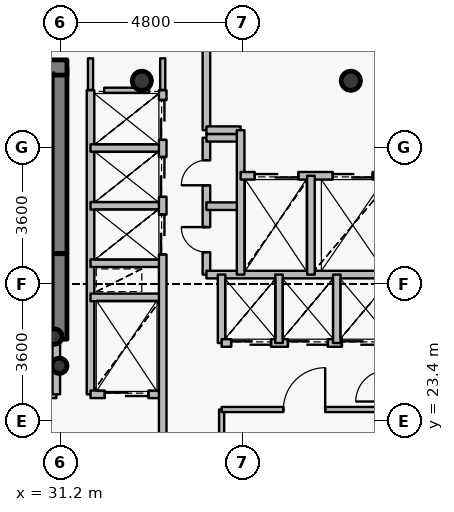
"""IFC4 building model, lengths in metres.
Left out: names, types, materials, properties, quantities, classifications, styles, units other than length and angle.
Written with IfcOpenShell. Run it as: python <this file> out.ifc"""

import sys

from ifc_helpers import new_model, si_unit, direction, frame, frame_2d, origin, origin_2d, place, context, subcontext, project, spatial, rectangle, hollow_circle, extrude, source, transform, mapped, element, fill, save


model = new_model("IFC4")
c1 = context("Model", 3, precision=1e-05, world=origin(), true_north=direction((0.0, 1.0)))
c2 = subcontext(c1, "Body", "Model", "MODEL_VIEW")
j1 = project(units=[si_unit("LENGTHUNIT", "METRE"), si_unit("PLANEANGLEUNIT", "RADIAN")], contexts=[c1])
p1 = place(None, origin())
s1 = spatial("IfcSite", under=j1, at=p1, CompositionType="ELEMENT")
p2 = place(p1, origin())
s2 = spatial("IfcBuilding", under=s1, at=p2, CompositionType="ELEMENT")
p3 = place(p2, frame((0.0, 0.0, 151.35)))
s3 = spatial("IfcBuildingStorey", under=s2, at=p3, CompositionType="ELEMENT", Elevation=151.35)
for number, where, z_axis, x_axis in (
    (1, (38.85, 32.35, 0.0), (0.0, 0.0, 1.0), (1.0, 0.0, 0.0)),
    (2, (33.35, 32.35, 0.0), (0.0, 0.0, 1.0), (1.0, 0.0, 0.0)),
):
    element("IfcColumn", number, at=place(p3, frame(where, z_axis=z_axis, x_axis=x_axis)), inside=s3, PredefinedType="COLUMN", context=c2, shape_type="SweptSolid", body=[
        extrude(hollow_circle(Radius=0.254, WallThickness=0.02, at=origin_2d()), origin(), (0.0, 0.0, 1.0), 4.8),
    ])
p4 = place(p3, frame((31.18, 27.8, 0.0), z_axis=(0.0, 0.0, 1.0), x_axis=(0.0, 1.0, 0.0)))
e3 = element("IfcWall", 3, at=p4, inside=s3, PredefinedType="SHEAR", context=c2, shape_type="SweptSolid", body=[
    extrude(rectangle(XDim=4.9, YDim=0.4, at=frame_2d((2.45, 0.0))), origin(), (0.0, 0.0, 1.0), 4.8),
])
p5 = place(p3, frame((27.28, 32.7, 0.0), z_axis=(0.0, 0.0, 1.0), x_axis=(1.0, 0.0, 0.0)))
e4 = element("IfcWall", 4, at=p5, inside=s3, PredefinedType="SHEAR", context=c2, shape_type="SweptSolid", body=[
    extrude(rectangle(XDim=4.1, YDim=0.4, at=frame_2d((2.05, 0.0))), origin(), (0.0, 0.0, 1.0), 4.8),
])
for number, where, z_axis, x_axis in (
    (5, (31.05, 25.62, 0.0), (0.0, 0.0, 1.0), (1.0, 0.0, 0.0)),
    (6, (31.18, 24.85, 0.0), (0.0, 0.0, 1.0), (1.0, 0.0, 0.0)),
):
    element("IfcColumn", number, at=place(p3, frame(where, z_axis=z_axis, x_axis=x_axis)), inside=s3, PredefinedType="COLUMN", context=c2, shape_type="SweptSolid", body=[
        extrude(hollow_circle(Radius=0.203, WallThickness=0.016, at=origin_2d()), origin(), (0.0, 0.0, 1.0), 4.8),
    ])
p6 = place(p3, frame((31.18, 25.55, 0.0), z_axis=(0.0, 0.0, 1.0), x_axis=(0.0, 1.0, 0.0)))
e7 = element("IfcWall", 7, at=p6, inside=s3, PredefinedType="SHEAR", context=c2, shape_type="SweptSolid", body=[
    extrude(rectangle(XDim=2.25, YDim=0.4, at=frame_2d((1.125, 0.0))), origin(), (0.0, 0.0, 1.0), 4.15),
])
p7 = place(p3, frame((27.56, 24.1, 0.0), z_axis=(0.0, 0.0, 1.0), x_axis=(1.0, 0.0, 0.0)))
e8 = element("IfcWall", 8, at=p7, inside=s3, PredefinedType="PARTITIONING", context=c2, shape_type="SweptSolid", body=[
    extrude(rectangle(XDim=3.54, YDim=0.2, at=frame_2d((1.77, 0.0))), origin(), (0.0, 0.0, 1.0), 4.55),
])
p8 = place(p7, frame((1.17, 0.0, 0.0)))
e9 = element("IfcOpeningElement", 9, at=p8, cuts=e8, PredefinedType="OPENING", context=c2, shape_type="SweptSolid", body=[
    extrude(rectangle(XDim=1.2, YDim=2.15, at=origin_2d()), frame((0.6, 0.11, 1.075), z_axis=(0.0, -1.0, 0.0), x_axis=(1.0, 0.0, 0.0)), (0.0, 0.0, 1.0), 0.22),
])
p9 = place(p3, frame((31.1, 24.1, 0.0), z_axis=(0.0, 0.0, 1.0), x_axis=(0.0, 1.0, 0.0)))
e10 = element("IfcWall", 10, at=p9, inside=s3, PredefinedType="PARTITIONING", context=c2, shape_type="SweptSolid", body=[
    extrude(rectangle(XDim=1.44, YDim=0.2, at=frame_2d((0.72, 0.0))), origin(), (0.0, 0.0, 1.0), 4.55),
])
p10 = place(p3, frame((32.0, 24.1, 0.0), z_axis=(0.0, 0.0, 1.0), x_axis=(0.0, 1.0, 0.0)))
e11 = element("IfcWall", 11, at=p10, inside=s3, PredefinedType="PARTITIONING", context=c2, shape_type="SweptSolid", body=[
    extrude(rectangle(XDim=8.0, YDim=0.2, at=frame_2d((4.0, 0.0))), origin(), (0.0, 0.0, 1.0), 4.55),
])
p11 = place(p3, frame((32.0, 24.1, 0.0), z_axis=(0.0, 0.0, 1.0), x_axis=(1.0, 0.0, 0.0)))
e12 = element("IfcWall", 12, at=p11, inside=s3, PredefinedType="PARTITIONING", context=c2, shape_type="SweptSolid", body=[
    extrude(rectangle(XDim=1.9, YDim=0.2, at=frame_2d((0.95, 0.0))), origin(), (0.0, 0.0, 1.0), 4.135),
])
p12 = place(p11, frame((0.375, 0.0, 0.0)))
e13 = element("IfcOpeningElement", 13, at=p12, cuts=e12, PredefinedType="OPENING", context=c2, shape_type="SweptSolid", body=[
    extrude(rectangle(XDim=1.15, YDim=2.15, at=origin_2d()), frame((0.575, 0.11, 1.075), z_axis=(0.0, -1.0, 0.0), x_axis=(1.0, 0.0, 0.0)), (0.0, 0.0, 1.0), 0.22),
])
for number, where, z_axis, x_axis in (
    (14, (32.0, 26.65, 0.0), (0.0, 0.0, 1.0), (1.0, 0.0, 0.0)),
    (15, (32.0, 27.55, 0.0), (0.0, 0.0, 1.0), (1.0, 0.0, 0.0)),
    (16, (32.0, 29.06, 0.0), (0.0, 0.0, 1.0), (1.0, 0.0, 0.0)),
    (17, (32.0, 30.58, 0.0), (0.0, 0.0, 1.0), (1.0, 0.0, 0.0)),
):
    element("IfcWall", number, at=place(p3, frame(where, z_axis=z_axis, x_axis=x_axis)), inside=s3, PredefinedType="PARTITIONING", context=c2, shape_type="SweptSolid", body=[
        extrude(rectangle(XDim=1.9, YDim=0.2, at=frame_2d((0.95, 0.0))), origin(), (0.0, 0.0, 1.0), 4.135),
    ])
p13 = place(p3, frame((33.9, 20.8, 0.0), z_axis=(0.0, 0.0, 1.0), x_axis=(0.0, 1.0, 0.0)))
e18 = element("IfcWall", 18, at=p13, inside=s3, PredefinedType="PARTITIONING", context=c2, shape_type="SweptSolid", body=[
    extrude(rectangle(XDim=11.3, YDim=0.2, at=frame_2d((5.65, 0.0))), origin(), (0.0, 0.0, 1.0), 4.135),
])
p14 = place(p13, frame((6.98, 0.0, 0.0)))
e19 = element("IfcOpeningElement", 19, at=p14, cuts=e18, PredefinedType="OPENING", context=c2, shape_type="SweptSolid", body=[
    extrude(rectangle(XDim=1.05, YDim=2.15, at=origin_2d()), frame((0.525, 0.11, 1.075), z_axis=(0.0, -1.0, 0.0), x_axis=(1.0, 0.0, 0.0)), (0.0, 0.0, 1.0), 0.22),
])
p15 = place(p13, frame((8.495, 0.0, 0.0)))
e20 = element("IfcOpeningElement", 20, at=p15, cuts=e18, PredefinedType="OPENING", context=c2, shape_type="SweptSolid", body=[
    extrude(rectangle(XDim=1.05, YDim=2.15, at=origin_2d()), frame((0.525, 0.11, 1.075), z_axis=(0.0, -1.0, 0.0), x_axis=(1.0, 0.0, 0.0)), (0.0, 0.0, 1.0), 0.22),
])
p16 = place(p13, frame((9.995, 0.0, 0.0)))
e21 = element("IfcOpeningElement", 21, at=p16, cuts=e18, PredefinedType="OPENING", context=c2, shape_type="SweptSolid", body=[
    extrude(rectangle(XDim=1.05, YDim=2.15, at=origin_2d()), frame((0.525, 0.11, 1.075), z_axis=(0.0, -1.0, 0.0), x_axis=(1.0, 0.0, 0.0)), (0.0, 0.0, 1.0), 0.22),
])
p17 = place(p3, frame((35.05, 27.25, 0.0), z_axis=(0.0, 0.0, 1.0), x_axis=(0.0, 1.0, 0.0)))
e22 = element("IfcWall", 22, at=p17, inside=s3, PredefinedType="PARTITIONING", context=c2, shape_type="SweptSolid", body=[
    extrude(rectangle(XDim=3.6, YDim=0.2, at=frame_2d((1.8, 0.0))), origin(), (0.0, 0.0, 1.0), 4.55),
])
p18 = place(p17, frame((0.59, 0.0, 0.0)))
e23 = element("IfcOpeningElement", 23, at=p18, cuts=e22, PredefinedType="OPENING", context=c2, shape_type="SweptSolid", body=[
    extrude(rectangle(XDim=0.66, YDim=2.05, at=origin_2d()), frame((0.33, 0.11, 1.025), z_axis=(0.0, -1.0, 0.0), x_axis=(1.0, 0.0, 0.0)), (0.0, 0.0, 1.0), 0.22),
])
p19 = place(p17, frame((2.35, 0.0, 0.0)))
e24 = element("IfcOpeningElement", 24, at=p19, cuts=e22, PredefinedType="OPENING", context=c2, shape_type="SweptSolid", body=[
    extrude(rectangle(XDim=0.66, YDim=2.05, at=origin_2d()), frame((0.33, 0.11, 1.025), z_axis=(0.0, -1.0, 0.0), x_axis=(1.0, 0.0, 0.0)), (0.0, 0.0, 1.0), 0.22),
])
p20 = place(p3, frame((35.05, 27.25, 0.0), z_axis=(0.0, 0.0, 1.0), x_axis=(1.0, 0.0, 0.0)))
e25 = element("IfcWall", 25, at=p20, inside=s3, PredefinedType="PARTITIONING", context=c2, shape_type="SweptSolid", body=[
    extrude(rectangle(XDim=4.95, YDim=0.2, at=frame_2d((2.475, 0.0))), origin(), (0.0, 0.0, 1.0), 4.135),
])
for number, where, z_axis, x_axis in (
    (26, (35.05, 29.05, 0.0), (0.0, 0.0, 1.0), (1.0, 0.0, 0.0)),
    (27, (35.05, 30.85, 0.0), (0.0, 0.0, 1.0), (1.0, 0.0, 0.0)),
):
    element("IfcWall", number, at=place(p3, frame(where, z_axis=z_axis, x_axis=x_axis)), inside=s3, PredefinedType="PARTITIONING", context=c2, shape_type="SweptSolid", body=[
        extrude(rectangle(XDim=0.9, YDim=0.2, at=frame_2d((0.45, 0.0))), origin(), (0.0, 0.0, 1.0), 4.55),
    ])
p21 = place(p3, frame((35.05, 31.05, 0.0), z_axis=(0.0, 0.0, 1.0), x_axis=(0.0, 1.0, 0.0)))
e28 = element("IfcWall", 28, at=p21, inside=s3, PredefinedType="PARTITIONING", context=c2, shape_type="SweptSolid", body=[
    extrude(rectangle(XDim=2.15, YDim=0.2, at=frame_2d((1.075, 0.0))), origin(), (0.0, 0.0, 1.0), 4.135),
])
p22 = place(p3, frame((35.05, 31.05, 0.0), z_axis=(0.0, 0.0, 1.0), x_axis=(1.0, 0.0, 0.0)))
e29 = element("IfcWall", 29, at=p22, inside=s3, PredefinedType="PARTITIONING", context=c2, shape_type="SweptSolid", body=[
    extrude(rectangle(XDim=0.9, YDim=0.2, at=frame_2d((0.45, 0.0))), origin(), (0.0, 0.0, 1.0), 4.55),
])
p23 = place(p3, frame((35.45, 20.8, 0.0), z_axis=(0.0, 0.0, 1.0), x_axis=(0.0, 1.0, 0.0)))
e30 = element("IfcWall", 30, at=p23, inside=s3, PredefinedType="PARTITIONING", context=c2, shape_type="SweptSolid", body=[
    extrude(rectangle(XDim=2.9, YDim=0.135, at=frame_2d((1.45, 0.0))), origin(), (0.0, 0.0, 1.0), 4.135),
])
p24 = place(p3, frame((35.45, 23.7, 0.0), z_axis=(0.0, 0.0, 1.0), x_axis=(1.0, 0.0, 0.0)))
e31 = element("IfcWall", 31, at=p24, inside=s3, PredefinedType="PARTITIONING", context=c2, shape_type="SweptSolid", body=[
    extrude(rectangle(XDim=4.35, YDim=0.135, at=frame_2d((2.175, 0.0))), origin(), (0.0, 0.0, 1.0), 4.135),
])
p25 = place(p24, frame((1.625, 0.0, 0.0)))
e32 = element("IfcOpeningElement", 32, at=p25, cuts=e31, PredefinedType="OPENING", context=c2, shape_type="SweptSolid", body=[
    extrude(rectangle(XDim=1.1, YDim=2.15, at=origin_2d()), frame((0.55, 0.078, 1.075), z_axis=(0.0, -1.0, 0.0), x_axis=(1.0, 0.0, 0.0)), (0.0, 0.0, 1.0), 0.155),
])
p26 = place(p3, frame((35.45, 25.45, 0.0), z_axis=(0.0, 0.0, 1.0), x_axis=(0.0, 1.0, 0.0)))
e33 = element("IfcWall", 33, at=p26, inside=s3, PredefinedType="PARTITIONING", context=c2, shape_type="SweptSolid", body=[
    extrude(rectangle(XDim=1.8, YDim=0.2, at=frame_2d((0.9, 0.0))), origin(), (0.0, 0.0, 1.0), 4.55),
])
p27 = place(p3, frame((35.45, 25.45, 0.0), z_axis=(0.0, 0.0, 1.0), x_axis=(1.0, 0.0, 0.0)))
e34 = element("IfcWall", 34, at=p27, inside=s3, PredefinedType="PARTITIONING", context=c2, shape_type="SweptSolid", body=[
    extrude(rectangle(XDim=4.55, YDim=0.2, at=frame_2d((2.275, 0.0))), origin(), (0.0, 0.0, 1.0), 4.135),
])
p28 = place(p27, frame((0.25, 0.0, 0.0)))
e35 = element("IfcOpeningElement", 35, at=p28, cuts=e34, PredefinedType="OPENING", context=c2, shape_type="SweptSolid", body=[
    extrude(rectangle(XDim=1.05, YDim=2.15, at=origin_2d()), frame((0.525, 0.11, 1.075), z_axis=(0.0, -1.0, 0.0), x_axis=(1.0, 0.0, 0.0)), (0.0, 0.0, 1.0), 0.22),
])
p29 = place(p27, frame((1.745, 0.0, 0.0)))
e36 = element("IfcOpeningElement", 36, at=p29, cuts=e34, PredefinedType="OPENING", context=c2, shape_type="SweptSolid", body=[
    extrude(rectangle(XDim=1.05, YDim=2.15, at=origin_2d()), frame((0.525, 0.11, 1.075), z_axis=(0.0, -1.0, 0.0), x_axis=(1.0, 0.0, 0.0)), (0.0, 0.0, 1.0), 0.22),
])
p30 = place(p27, frame((3.165, 0.0, 0.0)))
e37 = element("IfcOpeningElement", 37, at=p30, cuts=e34, PredefinedType="OPENING", context=c2, shape_type="SweptSolid", body=[
    extrude(rectangle(XDim=1.05, YDim=2.15, at=origin_2d()), frame((0.525, 0.11, 1.075), z_axis=(0.0, -1.0, 0.0), x_axis=(1.0, 0.0, 0.0)), (0.0, 0.0, 1.0), 0.22),
])
p31 = place(p3, frame((35.95, 27.25, 0.0), z_axis=(0.0, 0.0, 1.0), x_axis=(0.0, 1.0, 0.0)))
e38 = element("IfcWall", 38, at=p31, inside=s3, PredefinedType="PARTITIONING", context=c2, shape_type="SweptSolid", body=[
    extrude(rectangle(XDim=3.8, YDim=0.2, at=frame_2d((1.9, 0.0))), origin(), (0.0, 0.0, 1.0), 4.55),
])
p32 = place(p3, frame((35.95, 29.85, 0.0), z_axis=(0.0, 0.0, 1.0), x_axis=(1.0, 0.0, 0.0)))
e39 = element("IfcWall", 39, at=p32, inside=s3, PredefinedType="PARTITIONING", context=c2, shape_type="SweptSolid", body=[
    extrude(rectangle(XDim=8.49, YDim=0.2, at=frame_2d((4.245, 0.0))), origin(), (0.0, 0.0, 1.0), 4.135),
])
p33 = place(p32, frame((6.1, 0.0, 0.0)))
e40 = element("IfcOpeningElement", 40, at=p33, cuts=e39, PredefinedType="OPENING", context=c2, shape_type="SweptSolid", body=[
    extrude(rectangle(XDim=1.2, YDim=2.15, at=origin_2d()), frame((0.6, 0.11, 1.075), z_axis=(0.0, -1.0, 0.0), x_axis=(1.0, 0.0, 0.0)), (0.0, 0.0, 1.0), 0.22),
])
p34 = place(p32, frame((0.37, 0.0, 0.0)))
e41 = element("IfcOpeningElement", 41, at=p34, cuts=e39, PredefinedType="OPENING", context=c2, shape_type="SweptSolid", body=[
    extrude(rectangle(XDim=1.15, YDim=2.15, at=origin_2d()), frame((0.575, 0.11, 1.075), z_axis=(0.0, -1.0, 0.0), x_axis=(1.0, 0.0, 0.0)), (0.0, 0.0, 1.0), 0.22),
])
p35 = place(p32, frame((2.425, 0.0, 0.0)))
e42 = element("IfcOpeningElement", 42, at=p35, cuts=e39, PredefinedType="OPENING", context=c2, shape_type="SweptSolid", body=[
    extrude(rectangle(XDim=1.05, YDim=2.15, at=origin_2d()), frame((0.525, 0.11, 1.075), z_axis=(0.0, -1.0, 0.0), x_axis=(1.0, 0.0, 0.0)), (0.0, 0.0, 1.0), 0.22),
])
p36 = place(p3, frame((36.96, 25.45, 0.0), z_axis=(0.0, 0.0, 1.0), x_axis=(0.0, 1.0, 0.0)))
e43 = element("IfcWall", 43, at=p36, inside=s3, PredefinedType="PARTITIONING", context=c2, shape_type="SweptSolid", body=[
    extrude(rectangle(XDim=1.8, YDim=0.2, at=frame_2d((0.9, 0.0))), origin(), (0.0, 0.0, 1.0), 4.55),
])
p37 = place(p3, frame((37.8, 27.25, 0.0), z_axis=(0.0, 0.0, 1.0), x_axis=(0.0, 1.0, 0.0)))
e44 = element("IfcWall", 44, at=p37, inside=s3, PredefinedType="PARTITIONING", context=c2, shape_type="SweptSolid", body=[
    extrude(rectangle(XDim=2.6, YDim=0.2, at=frame_2d((1.3, 0.0))), origin(), (0.0, 0.0, 1.0), 4.55),
])
p38 = place(p3, frame((38.48, 25.45, 0.0), z_axis=(0.0, 0.0, 1.0), x_axis=(0.0, 1.0, 0.0)))
e45 = element("IfcWall", 45, at=p38, inside=s3, PredefinedType="PARTITIONING", context=c2, shape_type="SweptSolid", body=[
    extrude(rectangle(XDim=1.8, YDim=0.2, at=frame_2d((0.9, 0.0))), origin(), (0.0, 0.0, 1.0), 4.55),
])
p39 = place(p3, frame((32.36, 32.1, 0.0), z_axis=(0.0, 0.0, 1.0), x_axis=(1.0, 0.0, 0.0)))
e46 = element("IfcWall", 46, at=p39, inside=s3, PredefinedType="PARTITIONING", context=c2, shape_type="SweptSolid", body=[
    extrude(rectangle(XDim=1.18, YDim=0.135, at=frame_2d((0.59, 0.0))), origin(), (0.0, 0.0, 1.0), 4.135),
])
p40 = place(p3, frame((32.0, 32.94, 0.0), z_axis=(0.0, 0.0, 1.0), x_axis=(0.0, -1.0, 0.0)))
e47 = element("IfcWall", 47, at=p40, inside=s3, PredefinedType="PARTITIONING", context=c2, shape_type="SweptSolid", body=[
    extrude(rectangle(XDim=0.83, YDim=0.135, at=frame_2d((0.415, 0.0))), origin(), (0.0, 0.0, 1.0), 4.085),
])
p41 = place(p3, frame((33.9, 32.11, 0.0), z_axis=(0.0, 0.0, 1.0), x_axis=(0.0, 1.0, 0.0)))
e48 = element("IfcWall", 48, at=p41, inside=s3, PredefinedType="PARTITIONING", context=c2, shape_type="SweptSolid", body=[
    extrude(rectangle(XDim=0.83, YDim=0.135, at=frame_2d((0.415, 0.0))), origin(), (0.0, 0.0, 1.0), 4.135),
])
m1 = source(origin(), c2, "Body", "SweptSolid", [
    extrude(rectangle(XDim=1.15, YDim=2.15, at=origin_2d()), frame((0.575, 0.025, 1.075), z_axis=(0.0, -1.0, 0.0), x_axis=(1.0, 0.0, 0.0)), (0.0, 0.0, 1.0), 0.05),
])
p42 = place(p34, origin())
e49 = element("IfcDoor", 49, at=p42, inside=s3, OperationType="DOUBLE_DOOR_SLIDING", PredefinedType="USERDEFINED", context=c2, shape_type="MappedRepresentation", body=[
    mapped(m1, transform((0.0, 0.0, 0.0), x_axis=(1.0, 0.0, 0.0), y_axis=(0.0, 1.0, 0.0), z_axis=(0.0, 0.0, 1.0), scale=1.0)),
])
fill(e41, e49)
p43 = place(p12, origin())
e50 = element("IfcDoor", 50, at=p43, inside=s3, OperationType="DOUBLE_DOOR_SLIDING", PredefinedType="USERDEFINED", context=c2, shape_type="MappedRepresentation", body=[
    mapped(m1, transform((0.0, 0.0, 0.0), x_axis=(1.0, 0.0, 0.0), y_axis=(0.0, 1.0, 0.0), z_axis=(0.0, 0.0, 1.0), scale=1.0)),
])
fill(e13, e50)
m2 = source(origin(), c2, "Body", "SweptSolid", [
    extrude(rectangle(XDim=1.05, YDim=2.15, at=origin_2d()), frame((0.525, 0.025, 1.075), z_axis=(0.0, -1.0, 0.0), x_axis=(1.0, 0.0, 0.0)), (0.0, 0.0, 1.0), 0.05),
])
p44 = place(p35, origin())
e51 = element("IfcDoor", 51, at=p44, inside=s3, OperationType="DOUBLE_DOOR_SLIDING", PredefinedType="USERDEFINED", context=c2, shape_type="MappedRepresentation", body=[
    mapped(m2, transform((0.0, 0.0, 0.0), x_axis=(1.0, 0.0, 0.0), y_axis=(0.0, 1.0, 0.0), z_axis=(0.0, 0.0, 1.0), scale=1.0)),
])
fill(e42, e51)
p45 = place(p14, origin())
e52 = element("IfcDoor", 52, at=p45, inside=s3, OperationType="DOUBLE_DOOR_SLIDING", PredefinedType="USERDEFINED", context=c2, shape_type="MappedRepresentation", body=[
    mapped(m2, transform((0.0, 0.0, 0.0), x_axis=(1.0, 0.0, 0.0), y_axis=(0.0, 1.0, 0.0), z_axis=(0.0, 0.0, 1.0), scale=1.0)),
])
fill(e19, e52)
p46 = place(p15, origin())
e53 = element("IfcDoor", 53, at=p46, inside=s3, OperationType="DOUBLE_DOOR_SLIDING", PredefinedType="USERDEFINED", context=c2, shape_type="MappedRepresentation", body=[
    mapped(m2, transform((0.0, 0.0, 0.0), x_axis=(1.0, 0.0, 0.0), y_axis=(0.0, 1.0, 0.0), z_axis=(0.0, 0.0, 1.0), scale=1.0)),
])
fill(e20, e53)
p47 = place(p16, origin())
e54 = element("IfcDoor", 54, at=p47, inside=s3, OperationType="DOUBLE_DOOR_SLIDING", PredefinedType="USERDEFINED", context=c2, shape_type="MappedRepresentation", body=[
    mapped(m2, transform((0.0, 0.0, 0.0), x_axis=(1.0, 0.0, 0.0), y_axis=(0.0, 1.0, 0.0), z_axis=(0.0, 0.0, 1.0), scale=1.0)),
])
fill(e21, e54)
p48 = place(p28, origin())
e55 = element("IfcDoor", 55, at=p48, inside=s3, OperationType="DOUBLE_DOOR_SLIDING", PredefinedType="USERDEFINED", context=c2, shape_type="MappedRepresentation", body=[
    mapped(m2, transform((0.0, 0.0, 0.0), x_axis=(1.0, 0.0, 0.0), y_axis=(0.0, 1.0, 0.0), z_axis=(0.0, 0.0, 1.0), scale=1.0)),
])
fill(e35, e55)
p49 = place(p29, origin())
e56 = element("IfcDoor", 56, at=p49, inside=s3, OperationType="DOUBLE_DOOR_SLIDING", PredefinedType="USERDEFINED", context=c2, shape_type="MappedRepresentation", body=[
    mapped(m2, transform((0.0, 0.0, 0.0), x_axis=(1.0, 0.0, 0.0), y_axis=(0.0, 1.0, 0.0), z_axis=(0.0, 0.0, 1.0), scale=1.0)),
])
fill(e36, e56)
p50 = place(p30, origin())
e57 = element("IfcDoor", 57, at=p50, inside=s3, OperationType="DOUBLE_DOOR_SLIDING", PredefinedType="USERDEFINED", context=c2, shape_type="MappedRepresentation", body=[
    mapped(m2, transform((0.0, 0.0, 0.0), x_axis=(1.0, 0.0, 0.0), y_axis=(0.0, 1.0, 0.0), z_axis=(0.0, 0.0, 1.0), scale=1.0)),
])
fill(e37, e57)
m3 = source(origin(), c2, "Body", "SweptSolid", [
    extrude(rectangle(XDim=0.66, YDim=2.05, at=origin_2d()), frame((0.33, 0.025, 1.025), z_axis=(0.0, -1.0, 0.0), x_axis=(1.0, 0.0, 0.0)), (0.0, 0.0, 1.0), 0.05),
])
p51 = place(p18, origin())
e58 = element("IfcDoor", 58, at=p51, inside=s3, OperationType="SINGLE_SWING_RIGHT", PredefinedType="USERDEFINED", context=c2, shape_type="MappedRepresentation", body=[
    mapped(m3, transform((0.0, 0.0, 0.0), x_axis=(1.0, 0.0, 0.0), y_axis=(0.0, 1.0, 0.0), z_axis=(0.0, 0.0, 1.0), scale=1.0)),
])
fill(e23, e58)
p52 = place(p19, origin())
e59 = element("IfcDoor", 59, at=p52, inside=s3, OperationType="SINGLE_SWING_LEFT", PredefinedType="USERDEFINED", context=c2, shape_type="MappedRepresentation", body=[
    mapped(m3, transform((0.0, 0.0, 0.0), x_axis=(1.0, 0.0, 0.0), y_axis=(0.0, 1.0, 0.0), z_axis=(0.0, 0.0, 1.0), scale=1.0)),
])
fill(e24, e59)
m4 = source(origin(), c2, "Body", "SweptSolid", [
    extrude(rectangle(XDim=1.1, YDim=2.15, at=origin_2d()), frame((0.55, 0.025, 1.075), z_axis=(0.0, -1.0, 0.0), x_axis=(1.0, 0.0, 0.0)), (0.0, 0.0, 1.0), 0.05),
])
p53 = place(p25, origin())
e60 = element("IfcDoor", 60, at=p53, inside=s3, OperationType="SINGLE_SWING_RIGHT", PredefinedType="DOOR", context=c2, shape_type="MappedRepresentation", body=[
    mapped(m4, transform((0.0, 0.0, 0.0), x_axis=(1.0, 0.0, 0.0), y_axis=(0.0, 1.0, 0.0), z_axis=(0.0, 0.0, 1.0), scale=1.0)),
])
fill(e32, e60)
save(model, sys.argv[1])
